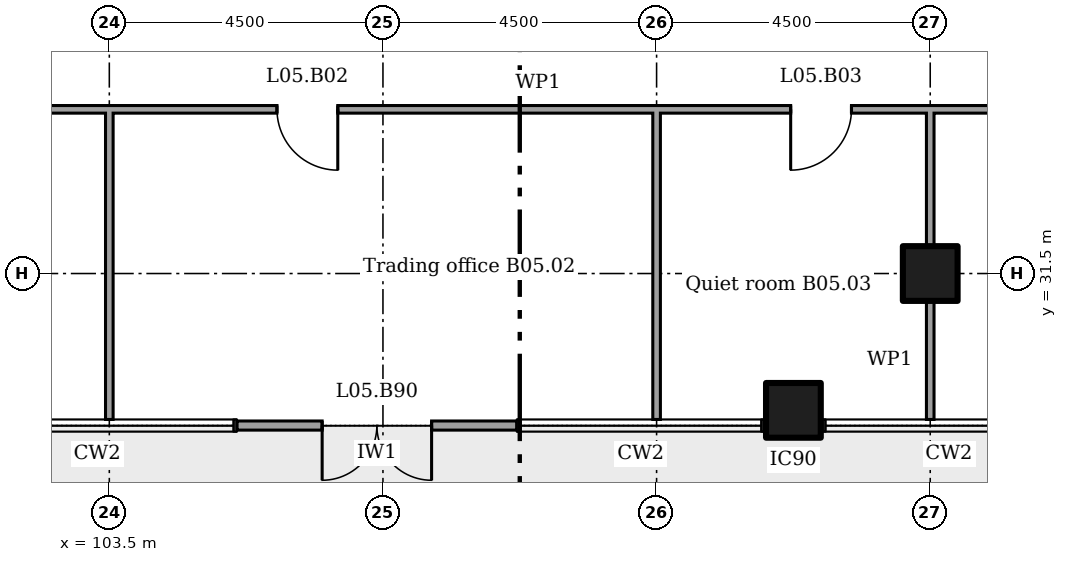
"""IFC4 building model, lengths in metres.
Left out: names, types, materials, properties, quantities, classifications, styles, units other than length and angle.
Written with IfcOpenShell. Run it as: python <this file> out.ifc"""

import sys

from ifc_helpers import new_model, si_unit, direction, frame, frame_2d, origin, origin_2d, place, context, subcontext, project, spatial, rectangle, extrude, element, fill, save


model = new_model("IFC4")
c1 = context("Model", 3, precision=1e-05, world=origin(), true_north=direction((0.0, 1.0)))
c2 = subcontext(c1, "Body", "Model", "MODEL_VIEW")
j1 = project(units=[si_unit("LENGTHUNIT", "METRE"), si_unit("PLANEANGLEUNIT", "RADIAN")], contexts=[c1])
p1 = place(None, origin())
s1 = spatial("IfcSite", under=j1, at=p1, CompositionType="ELEMENT")
p2 = place(p1, origin())
s2 = spatial("IfcBuilding", under=s1, at=p2, CompositionType="ELEMENT")
p3 = place(p2, frame((0.0, 0.0, 25.4)))
s3 = spatial("IfcBuildingStorey", under=s2, at=p3, CompositionType="ELEMENT", Elevation=25.4)
for number, where in (
    (1, (114.75, 29.25, 0.0)),
    (2, (117.0, 31.5, 0.0)),
):
    element("IfcColumn", number, at=place(p3, frame(where)), inside=s3, PredefinedType="COLUMN", context=c2, shape_type="SweptSolid", body=[
        extrude(rectangle(XDim=0.9, YDim=0.9, at=origin_2d()), origin(), (0.0, 0.0, 1.0), 4.4),
    ])
p4 = place(p3, frame((105.6, 29.0, 0.0)))
e3 = element("IfcWall", 3, at=p4, inside=s3, PredefinedType="SOLIDWALL", context=c2, shape_type="SweptSolid", body=[
    extrude(rectangle(XDim=4.6, YDim=0.15, at=frame_2d((2.3, 0.0))), origin(), (0.0, 0.0, 1.0), 4.225),
])
p5 = place(p4, frame((1.4, 0.0, 0.0)))
e4 = element("IfcOpeningElement", 4, at=p5, cuts=e3, PredefinedType="OPENING", context=c2, shape_type="SweptSolid", body=[
    extrude(rectangle(XDim=1.8, YDim=2.4, at=frame_2d((0.9, 1.2))), frame((0.0, 0.085, 0.0), z_axis=(0.0, -1.0, 0.0), x_axis=(1.0, 0.0, 0.0)), (0.0, 0.0, 1.0), 0.17),
])
p6 = place(p3, frame((101.038, 34.2, 0.0)))
e5 = element("IfcWall", 5, at=p6, inside=s3, PredefinedType="PARTITIONING", context=c2, shape_type="SweptSolid", body=[
    extrude(rectangle(XDim=19.025, YDim=0.125, at=frame_2d((9.512, 0.0))), origin(), (0.0, 0.0, 1.0), 4.225),
])
p7 = place(p6, frame((5.219, 0.0, 0.0)))
e6 = element("IfcOpeningElement", 6, at=p7, cuts=e5, PredefinedType="OPENING", context=c2, shape_type="SweptSolid", body=[
    extrude(rectangle(XDim=1.0, YDim=2.1, at=frame_2d((0.5, 1.05))), frame((0.0, 0.073, 0.0), z_axis=(0.0, -1.0, 0.0), x_axis=(1.0, 0.0, 0.0)), (0.0, 0.0, 1.0), 0.145),
])
p8 = place(p6, frame((13.667, 0.0, 0.0)))
e7 = element("IfcOpeningElement", 7, at=p8, cuts=e5, PredefinedType="OPENING", context=c2, shape_type="SweptSolid", body=[
    extrude(rectangle(XDim=1.0, YDim=2.1, at=frame_2d((0.5, 1.05))), frame((0.0, 0.073, 0.0), z_axis=(0.0, -1.0, 0.0), x_axis=(1.0, 0.0, 0.0)), (0.0, 0.0, 1.0), 0.145),
])
for number, where, z_axis, x_axis in (
    (8, (103.5, 29.1, 0.0), (0.0, 0.0, 1.0), (0.0, 1.0, 0.0)),
    (9, (112.5, 29.1, 0.0), (0.0, 0.0, 1.0), (0.0, 1.0, 0.0)),
):
    element("IfcWall", number, at=place(p3, frame(where, z_axis=z_axis, x_axis=x_axis)), inside=s3, PredefinedType="PARTITIONING", context=c2, shape_type="SweptSolid", body=[
        extrude(rectangle(XDim=5.1, YDim=0.125, at=frame_2d((2.55, 0.0))), origin(), (0.0, 0.0, 1.0), 3.613),
    ])
p9 = place(p3, frame((117.0, 29.1, 0.0), z_axis=(0.0, 0.0, 1.0), x_axis=(0.0, 1.0, 0.0)))
e10 = element("IfcWall", 10, at=p9, inside=s3, PredefinedType="PARTITIONING", context=c2, shape_type="SweptSolid", body=[
    extrude(rectangle(XDim=1.95, YDim=0.125, at=frame_2d((0.975, 0.0))), origin(), (0.0, 0.0, 1.0), 3.602),
])
p10 = place(p3, frame((117.0, 31.95, 0.0), z_axis=(0.0, 0.0, 1.0), x_axis=(0.0, 1.0, 0.0)))
e11 = element("IfcWall", 11, at=p10, inside=s3, PredefinedType="PARTITIONING", context=c2, shape_type="SweptSolid", body=[
    extrude(rectangle(XDim=2.25, YDim=0.125, at=frame_2d((1.125, 0.0))), origin(), (0.0, 0.0, 1.0), 3.602),
])
p11 = place(p5, frame((1.8, 0.0, 0.0), x_axis=(-1.0, 0.0, 0.0)))
e12 = element("IfcDoor", 12, at=p11, inside=s3, OperationType="DOUBLE_DOOR_DOUBLE_SWING", PredefinedType="NOTDEFINED", context=c2, shape_type="SweptSolid", body=[
    extrude(rectangle(XDim=1.8, YDim=2.4, at=frame_2d((0.9, 1.2))), frame((0.0, 0.025, 0.0), z_axis=(0.0, -1.0, 0.0), x_axis=(1.0, 0.0, 0.0)), (0.0, 0.0, 1.0), 0.05),
])
fill(e4, e12)
p12 = place(p7, frame((1.0, 0.0, 0.0), x_axis=(-1.0, 0.0, 0.0)))
e13 = element("IfcDoor", 13, at=p12, inside=s3, OperationType="SINGLE_SWING_RIGHT", PredefinedType="DOOR", context=c2, shape_type="SweptSolid", body=[
    extrude(rectangle(XDim=1.0, YDim=2.1, at=frame_2d((0.5, 1.05))), frame((0.0, 0.025, 0.0), z_axis=(0.0, -1.0, 0.0), x_axis=(1.0, 0.0, 0.0)), (0.0, 0.0, 1.0), 0.05),
])
fill(e6, e13)
p13 = place(p8, frame((1.0, 0.0, 0.0), x_axis=(-1.0, 0.0, 0.0)))
e14 = element("IfcDoor", 14, at=p13, inside=s3, OperationType="SINGLE_SWING_LEFT", PredefinedType="DOOR", context=c2, shape_type="SweptSolid", body=[
    extrude(rectangle(XDim=1.0, YDim=2.1, at=frame_2d((0.5, 1.05))), frame((0.0, 0.025, 0.0), z_axis=(0.0, -1.0, 0.0), x_axis=(1.0, 0.0, 0.0)), (0.0, 0.0, 1.0), 0.05),
])
fill(e7, e14)
save(model, sys.argv[1])
